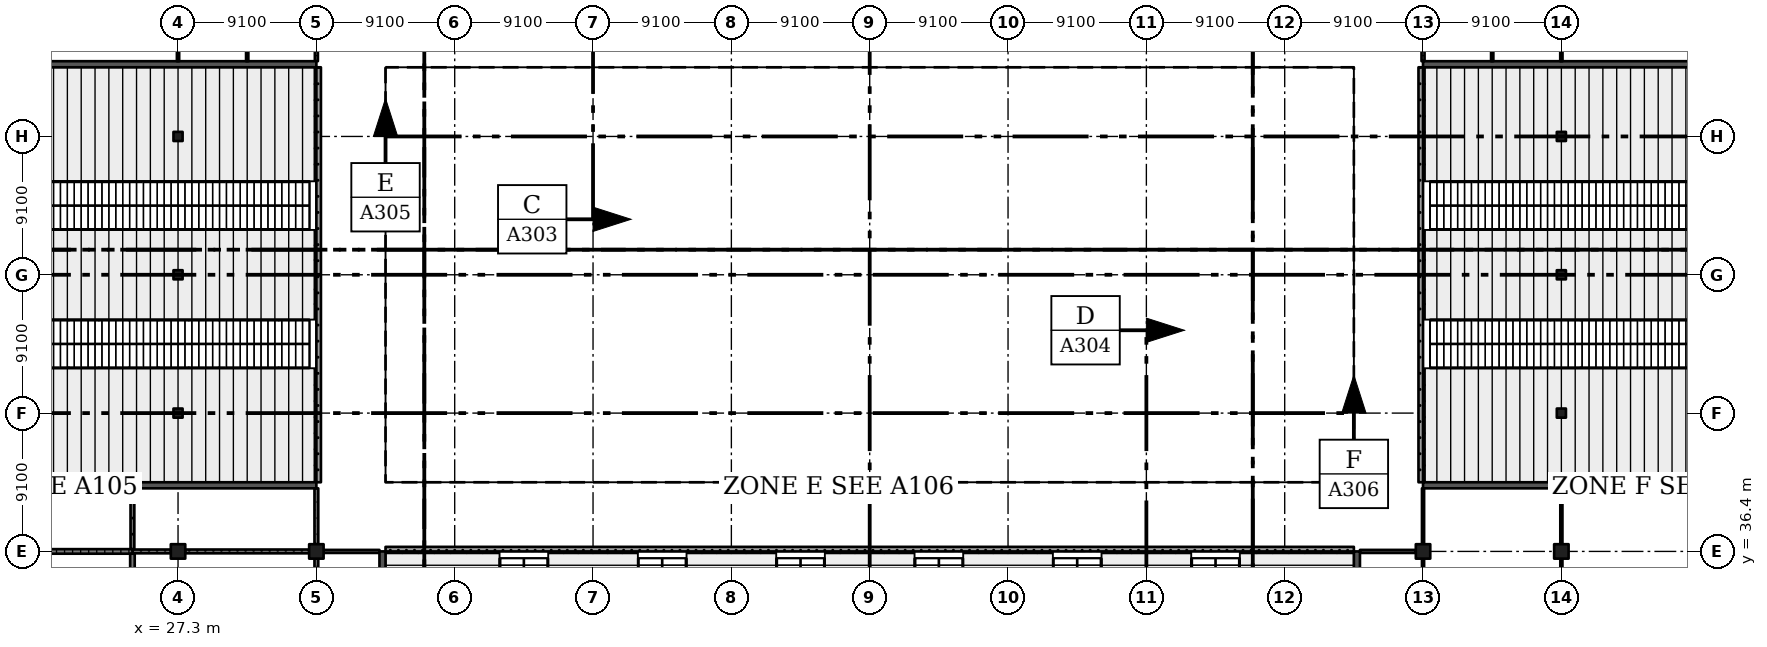
"""IFC4 building model, lengths in metres.
Left out: names, types, materials, properties, quantities, classifications, styles, units other than length and angle.
Written with IfcOpenShell. Run it as: python <this file> out.ifc"""

import sys

from ifc_helpers import new_model, si_unit, direction, frame, frame_2d, origin, origin_2d, place, context, subcontext, project, spatial, rectangle, extrude, element, fill, save


model = new_model("IFC4")
c1 = context("Model", 3, precision=1e-05, world=origin(), true_north=direction((0.0, 1.0)))
c2 = subcontext(c1, "Body", "Model", "MODEL_VIEW")
j1 = project(units=[si_unit("LENGTHUNIT", "METRE"), si_unit("PLANEANGLEUNIT", "RADIAN")], contexts=[c1])
p1 = place(None, origin())
s1 = spatial("IfcSite", under=j1, at=p1, CompositionType="ELEMENT")
p2 = place(p1, origin())
s2 = spatial("IfcBuilding", under=s1, at=p2, CompositionType="ELEMENT")
p3 = place(p2, origin())
s3 = spatial("IfcBuildingStorey", under=s2, at=p3, CompositionType="ELEMENT", Elevation=0.0)
p4 = place(p3, frame((27.3, 36.4, -0.4), z_axis=(0.0, 0.0, 1.0), x_axis=(1.0, 0.0, 0.0)))
e1 = element("IfcColumn", 1, at=p4, inside=s3, PredefinedType="COLUMN", context=c2, shape_type="SweptSolid", body=[
    extrude(rectangle(XDim=0.95, YDim=0.95, at=origin_2d()), origin(), (0.0, 0.0, 1.0), 6.77),
])
for number, where, z_axis, x_axis in (
    (2, (27.3, 45.5, -0.4), (0.0, 0.0, 1.0), (1.0, 0.0, 0.0)),
    (3, (27.3, 54.6, -0.4), (0.0, 0.0, 1.0), (1.0, 0.0, 0.0)),
    (4, (27.3, 63.7, -0.4), (0.0, 0.0, 1.0), (1.0, 0.0, 0.0)),
):
    element("IfcColumn", number, at=place(p3, frame(where, z_axis=z_axis, x_axis=x_axis)), inside=s3, PredefinedType="COLUMN", context=c2, shape_type="SweptSolid", body=[
        extrude(rectangle(XDim=0.6, YDim=0.6, at=origin_2d()), origin(), (0.0, 0.0, 1.0), 2.133),
    ])
for number, where, z_axis, x_axis in (
    (5, (36.4, 36.4, -0.4), (0.0, 0.0, 1.0), (1.0, 0.0, 0.0)),
    (6, (109.2, 36.4, -0.4), (0.0, 0.0, 1.0), (1.0, 0.0, 0.0)),
    (7, (118.3, 36.4, -0.4), (0.0, 0.0, 1.0), (1.0, 0.0, 0.0)),
):
    element("IfcColumn", number, at=place(p3, frame(where, z_axis=z_axis, x_axis=x_axis)), inside=s3, PredefinedType="COLUMN", context=c2, shape_type="SweptSolid", body=[
        extrude(rectangle(XDim=0.95, YDim=0.95, at=origin_2d()), origin(), (0.0, 0.0, 1.0), 6.77),
    ])
for number, where, z_axis, x_axis in (
    (8, (118.3, 45.5, -0.4), (0.0, 0.0, 1.0), (1.0, 0.0, 0.0)),
    (9, (118.3, 54.6, -0.4), (0.0, 0.0, 1.0), (1.0, 0.0, 0.0)),
    (10, (118.3, 63.7, -0.4), (0.0, 0.0, 1.0), (1.0, 0.0, 0.0)),
):
    element("IfcColumn", number, at=place(p3, frame(where, z_axis=z_axis, x_axis=x_axis)), inside=s3, PredefinedType="COLUMN", context=c2, shape_type="SweptSolid", body=[
        extrude(rectangle(XDim=0.6, YDim=0.6, at=origin_2d()), origin(), (0.0, 0.0, 1.0), 2.133),
    ])
p5 = place(p3, frame((40.95, 36.55, -0.4), z_axis=(0.0, 0.0, 1.0), x_axis=(1.0, 0.0, 0.0)))
e11 = element("IfcWall", 11, at=p5, inside=s3, PredefinedType="SOLIDWALL", context=c2, shape_type="SweptSolid", body=[
    extrude(rectangle(XDim=63.7, YDim=0.3, at=frame_2d((31.85, 0.0))), origin(), (0.0, 0.0, 1.0), 1.45),
])
for number, where, z_axis, x_axis in (
    (12, (109.05, 40.95, -0.4), (0.0, 0.0, 1.0), (0.0, 1.0, 0.0)),
    (13, (36.55, 40.95, -0.4), (0.0, 0.0, 1.0), (0.0, 1.0, 0.0)),
):
    element("IfcWall", number, at=place(p3, frame(where, z_axis=z_axis, x_axis=x_axis)), inside=s3, PredefinedType="SOLIDWALL", context=c2, shape_type="SweptSolid", body=[
        extrude(rectangle(XDim=27.3, YDim=0.3, at=frame_2d((13.65, 0.0))), origin(), (0.0, 0.0, 1.0), 1.45),
    ])
p6 = place(p3, frame((40.75, 36.4, -0.4), z_axis=(0.0, 0.0, 1.0), x_axis=(0.0, -1.0, 0.0)))
e14 = element("IfcWall", 14, at=p6, inside=s3, PredefinedType="SHEAR", context=c2, shape_type="SweptSolid", body=[
    extrude(rectangle(XDim=6.409, YDim=0.4, at=frame_2d((3.205, 0.0))), origin(), (0.0, 0.0, 1.0), 6.77),
])
for number, where, z_axis, x_axis in (
    (15, (104.85, 36.4, -0.4), (0.0, 0.0, 1.0), (0.0, -1.0, 0.0)),
    (16, (109.2, 40.75, -0.4), (0.0, 0.0, 1.0), (1.0, 0.0, 0.0)),
    (17, (109.2, 68.45, -0.4), (0.0, 0.0, 1.0), (1.0, 0.0, 0.0)),
    (18, (36.4, 40.75, -0.4), (0.0, 0.0, 1.0), (-1.0, 0.0, 0.0)),
    (19, (36.4, 68.45, -0.4), (0.0, 0.0, 1.0), (-1.0, 0.0, 0.0)),
):
    element("IfcWall", number, at=place(p3, frame(where, z_axis=z_axis, x_axis=x_axis)), inside=s3, PredefinedType="SHEAR", context=c2, shape_type="SweptSolid", body=[
        extrude(rectangle(XDim=18.2, YDim=0.4, at=frame_2d((9.1, 0.0))), origin(), (0.0, 0.0, 1.0), 6.77),
    ])
p7 = place(p3, frame((18.675, 36.4, 0.0), z_axis=(0.0, 0.0, 1.0), x_axis=(1.0, 0.0, 0.0)))
e20 = element("IfcWall", 20, at=p7, inside=s3, PredefinedType="SOLIDWALL", context=c2, shape_type="SweptSolid", body=[
    extrude(rectangle(XDim=5.625, YDim=0.3, at=frame_2d((2.812, 0.0))), origin(), (0.0, 0.0, 1.0), 5.32),
])
p8 = place(p7, frame((2.35, 0.0, 0.0)))
e21 = element("IfcOpeningElement", 21, at=p8, cuts=e20, PredefinedType="OPENING", context=c2, shape_type="SweptSolid", body=[
    extrude(rectangle(XDim=1.0, YDim=2.1, at=frame_2d((0.5, 1.05))), frame((0.0, 0.16, 0.0), z_axis=(0.0, -1.0, 0.0), x_axis=(1.0, 0.0, 0.0)), (0.0, 0.0, 1.0), 0.32),
])
p9 = place(p3, frame((24.3, 36.25, 0.0), z_axis=(0.0, 0.0, 1.0), x_axis=(0.0, -1.0, 0.0)))
e22 = element("IfcWall", 22, at=p9, inside=s3, PredefinedType="SOLIDWALL", context=c2, shape_type="SweptSolid", body=[
    extrude(rectangle(XDim=6.32, YDim=0.3, at=frame_2d((3.16, 0.0))), origin(), (0.0, 0.0, 1.0), 6.02),
])
p10 = place(p3, frame((24.3, 36.4, 0.0), z_axis=(0.0, 0.0, 1.0), x_axis=(1.0, 0.0, 0.0)))
e23 = element("IfcWall", 23, at=p10, inside=s3, PredefinedType="SOLIDWALL", context=c2, shape_type="SweptSolid", body=[
    extrude(rectangle(XDim=2.525, YDim=0.25, at=frame_2d((1.262, 0.0))), origin(), (0.0, 0.0, 1.0), 5.32),
])
p11 = place(p3, frame((24.3, 40.55, 0.0), z_axis=(0.0, 0.0, 1.0), x_axis=(0.0, -1.0, 0.0)))
e24 = element("IfcWall", 24, at=p11, inside=s3, PredefinedType="SOLIDWALL", context=c2, shape_type="SweptSolid", body=[
    extrude(rectangle(XDim=4.0, YDim=0.25, at=frame_2d((2.0, 0.0))), origin(), (0.0, 0.0, 1.0), 6.02),
])
p12 = place(p3, frame((27.3, 72.325, 0.0), z_axis=(0.0, 0.0, 1.0), x_axis=(0.0, -1.0, 0.0)))
e25 = element("IfcWall", 25, at=p12, inside=s3, PredefinedType="PARTITIONING", context=c2, shape_type="SweptSolid", body=[
    extrude(rectangle(XDim=3.675, YDim=0.15, at=frame_2d((1.837, 0.0))), origin(), (0.0, 0.0, 1.0), 6.02),
])
p13 = place(p3, frame((27.775, 36.4, 0.0), z_axis=(0.0, 0.0, 1.0), x_axis=(1.0, 0.0, 0.0)))
e26 = element("IfcWall", 26, at=p13, inside=s3, PredefinedType="SOLIDWALL", context=c2, shape_type="SweptSolid", body=[
    extrude(rectangle(XDim=8.15, YDim=0.25, at=frame_2d((4.075, 0.0))), origin(), (0.0, 0.0, 1.0), 5.32),
])
p14 = place(p3, frame((31.85, 76.2, 0.0), z_axis=(0.0, 0.0, 1.0), x_axis=(0.0, -1.0, 0.0)))
e27 = element("IfcWall", 27, at=p14, inside=s3, PredefinedType="PARTITIONING", context=c2, shape_type="SweptSolid", body=[
    extrude(rectangle(XDim=7.55, YDim=0.15, at=frame_2d((3.775, 0.0))), origin(), (0.0, 0.0, 1.0), 6.02),
])
p15 = place(p3, frame((36.4, 35.925, 0.0), z_axis=(0.0, 0.0, 1.0), x_axis=(0.0, -1.0, 0.0)))
e28 = element("IfcWall", 28, at=p15, inside=s3, PredefinedType="SOLIDWALL", context=c2, shape_type="SweptSolid", body=[
    extrude(rectangle(XDim=8.175, YDim=0.25, at=frame_2d((4.087, 0.0))), origin(), (0.0, 0.0, 1.0), 5.32),
])
p16 = place(p3, frame((36.4, 40.55, 0.0), z_axis=(0.0, 0.0, 1.0), x_axis=(0.0, -1.0, 0.0)))
e29 = element("IfcWall", 29, at=p16, inside=s3, PredefinedType="SOLIDWALL", context=c2, shape_type="SweptSolid", body=[
    extrude(rectangle(XDim=3.675, YDim=0.25, at=frame_2d((1.837, 0.0))), origin(), (0.0, 0.0, 1.0), 6.02),
])
p17 = place(p16, frame((1.35, 0.0, 0.0)))
e30 = element("IfcOpeningElement", 30, at=p17, cuts=e29, PredefinedType="OPENING", context=c2, shape_type="SweptSolid", body=[
    extrude(rectangle(XDim=1.0, YDim=2.1, at=frame_2d((0.5, 1.05))), frame((0.0, 0.135, 0.0), z_axis=(0.0, -1.0, 0.0), x_axis=(1.0, 0.0, 0.0)), (0.0, 0.0, 1.0), 0.27),
])
p18 = place(p3, frame((36.4, 72.325, 0.0), z_axis=(0.0, 0.0, 1.0), x_axis=(0.0, -1.0, 0.0)))
e31 = element("IfcWall", 31, at=p18, inside=s3, PredefinedType="PARTITIONING", context=c2, shape_type="SweptSolid", body=[
    extrude(rectangle(XDim=3.675, YDim=0.2, at=frame_2d((1.837, 0.0))), origin(), (0.0, 0.0, 1.0), 6.02),
])
p19 = place(p3, frame((36.875, 36.4, 0.0), z_axis=(0.0, 0.0, 1.0), x_axis=(1.0, 0.0, 0.0)))
e32 = element("IfcWall", 32, at=p19, inside=s3, PredefinedType="PARTITIONING", context=c2, shape_type="SweptSolid", body=[
    extrude(rectangle(XDim=3.675, YDim=0.2, at=frame_2d((1.837, 0.0))), origin(), (0.0, 0.0, 1.0), 6.02),
])
p20 = place(p19, frame((0.65, 0.0, 0.0)))
e33 = element("IfcOpeningElement", 33, at=p20, cuts=e32, PredefinedType="OPENING", context=c2, shape_type="SweptSolid", body=[
    extrude(rectangle(XDim=2.4, YDim=2.4, at=frame_2d((1.2, 1.2))), frame((0.0, 0.11, 0.0), z_axis=(0.0, -1.0, 0.0), x_axis=(1.0, 0.0, 0.0)), (0.0, 0.0, 1.0), 0.22),
])
p21 = place(p3, frame((105.05, 36.4, 0.0), z_axis=(0.0, 0.0, 1.0), x_axis=(1.0, 0.0, 0.0)))
e34 = element("IfcWall", 34, at=p21, inside=s3, PredefinedType="PARTITIONING", context=c2, shape_type="SweptSolid", body=[
    extrude(rectangle(XDim=3.675, YDim=0.2, at=frame_2d((1.837, 0.0))), origin(), (0.0, 0.0, 1.0), 6.02),
])
p22 = place(p21, frame((0.65, 0.0, 0.0)))
e35 = element("IfcOpeningElement", 35, at=p22, cuts=e34, PredefinedType="OPENING", context=c2, shape_type="SweptSolid", body=[
    extrude(rectangle(XDim=2.4, YDim=2.4, at=frame_2d((1.2, 1.2))), frame((0.0, 0.11, 0.0), z_axis=(0.0, -1.0, 0.0), x_axis=(1.0, 0.0, 0.0)), (0.0, 0.0, 1.0), 0.22),
])
p23 = place(p3, frame((109.2, 33.0, 0.0), z_axis=(0.0, 0.0, 1.0), x_axis=(0.0, 1.0, 0.0)))
e36 = element("IfcWall", 36, at=p23, inside=s3, PredefinedType="SOLIDWALL", context=c2, shape_type="SweptSolid", body=[
    extrude(rectangle(XDim=2.925, YDim=0.14, at=frame_2d((1.462, 0.0))), origin(), (0.0, 0.0, 1.0), 5.32),
])
p24 = place(p3, frame((109.2, 36.875, 0.0), z_axis=(0.0, 0.0, 1.0), x_axis=(0.0, 1.0, 0.0)))
e37 = element("IfcWall", 37, at=p24, inside=s3, PredefinedType="SOLIDWALL", context=c2, shape_type="SweptSolid", body=[
    extrude(rectangle(XDim=3.675, YDim=0.14, at=frame_2d((1.837, 0.0))), origin(), (0.0, 0.0, 1.0), 6.02),
])
p25 = place(p3, frame((109.2, 68.65, 0.0), z_axis=(0.0, 0.0, 1.0), x_axis=(0.0, 1.0, 0.0)))
e38 = element("IfcWall", 38, at=p25, inside=s3, PredefinedType="PARTITIONING", context=c2, shape_type="SweptSolid", body=[
    extrude(rectangle(XDim=3.675, YDim=0.2, at=frame_2d((1.837, 0.0))), origin(), (0.0, 0.0, 1.0), 6.02),
])
p26 = place(p3, frame((113.75, 68.65, 0.0), z_axis=(0.0, 0.0, 1.0), x_axis=(0.0, 1.0, 0.0)))
e39 = element("IfcWall", 39, at=p26, inside=s3, PredefinedType="PARTITIONING", context=c2, shape_type="SweptSolid", body=[
    extrude(rectangle(XDim=6.95, YDim=0.15, at=frame_2d((3.475, 0.0))), origin(), (0.0, 0.0, 1.0), 6.02),
])
p27 = place(p3, frame((118.3, 33.0, 0.0), z_axis=(0.0, 0.0, 1.0), x_axis=(0.0, 1.0, 0.0)))
e40 = element("IfcWall", 40, at=p27, inside=s3, PredefinedType="SOLIDWALL", context=c2, shape_type="SweptSolid", body=[
    extrude(rectangle(XDim=2.925, YDim=0.14, at=frame_2d((1.462, 0.0))), origin(), (0.0, 0.0, 1.0), 5.32),
])
p28 = place(p3, frame((118.3, 36.875, 0.0), z_axis=(0.0, 0.0, 1.0), x_axis=(0.0, 1.0, 0.0)))
e41 = element("IfcWall", 41, at=p28, inside=s3, PredefinedType="SOLIDWALL", context=c2, shape_type="SweptSolid", body=[
    extrude(rectangle(XDim=3.675, YDim=0.14, at=frame_2d((1.837, 0.0))), origin(), (0.0, 0.0, 1.0), 6.02),
])
p29 = place(p3, frame((118.3, 68.65, 0.0), z_axis=(0.0, 0.0, 1.0), x_axis=(0.0, 1.0, 0.0)))
e42 = element("IfcWall", 42, at=p29, inside=s3, PredefinedType="PARTITIONING", context=c2, shape_type="SweptSolid", body=[
    extrude(rectangle(XDim=3.675, YDim=0.15, at=frame_2d((1.837, 0.0))), origin(), (0.0, 0.0, 1.0), 6.02),
])
p30 = place(p8, origin())
e43 = element("IfcDoor", 43, at=p30, inside=s3, OperationType="SINGLE_SWING_LEFT", PredefinedType="DOOR", context=c2, shape_type="SweptSolid", body=[
    extrude(rectangle(XDim=1.0, YDim=2.1, at=frame_2d((0.5, 1.05))), frame((0.0, 0.025, 0.0), z_axis=(0.0, -1.0, 0.0), x_axis=(1.0, 0.0, 0.0)), (0.0, 0.0, 1.0), 0.05),
])
fill(e21, e43)
p31 = place(p17, origin())
e44 = element("IfcDoor", 44, at=p31, inside=s3, OperationType="SINGLE_SWING_RIGHT", PredefinedType="DOOR", context=c2, shape_type="SweptSolid", body=[
    extrude(rectangle(XDim=1.0, YDim=2.1, at=frame_2d((0.5, 1.05))), frame((0.0, 0.025, 0.0), z_axis=(0.0, -1.0, 0.0), x_axis=(1.0, 0.0, 0.0)), (0.0, 0.0, 1.0), 0.05),
])
fill(e30, e44)
p32 = place(p20, origin())
e45 = element("IfcDoor", 45, at=p32, inside=s3, OperationType="DOUBLE_DOOR_SINGLE_SWING", PredefinedType="DOOR", context=c2, shape_type="SweptSolid", body=[
    extrude(rectangle(XDim=2.4, YDim=2.4, at=frame_2d((1.2, 1.2))), frame((0.0, 0.025, 0.0), z_axis=(0.0, -1.0, 0.0), x_axis=(1.0, 0.0, 0.0)), (0.0, 0.0, 1.0), 0.05),
])
fill(e33, e45)
p33 = place(p22, origin())
e46 = element("IfcDoor", 46, at=p33, inside=s3, OperationType="DOUBLE_DOOR_SINGLE_SWING", PredefinedType="DOOR", context=c2, shape_type="SweptSolid", body=[
    extrude(rectangle(XDim=2.4, YDim=2.4, at=frame_2d((1.2, 1.2))), frame((0.0, 0.025, 0.0), z_axis=(0.0, -1.0, 0.0), x_axis=(1.0, 0.0, 0.0)), (0.0, 0.0, 1.0), 0.05),
])
fill(e35, e46)
save(model, sys.argv[1])
